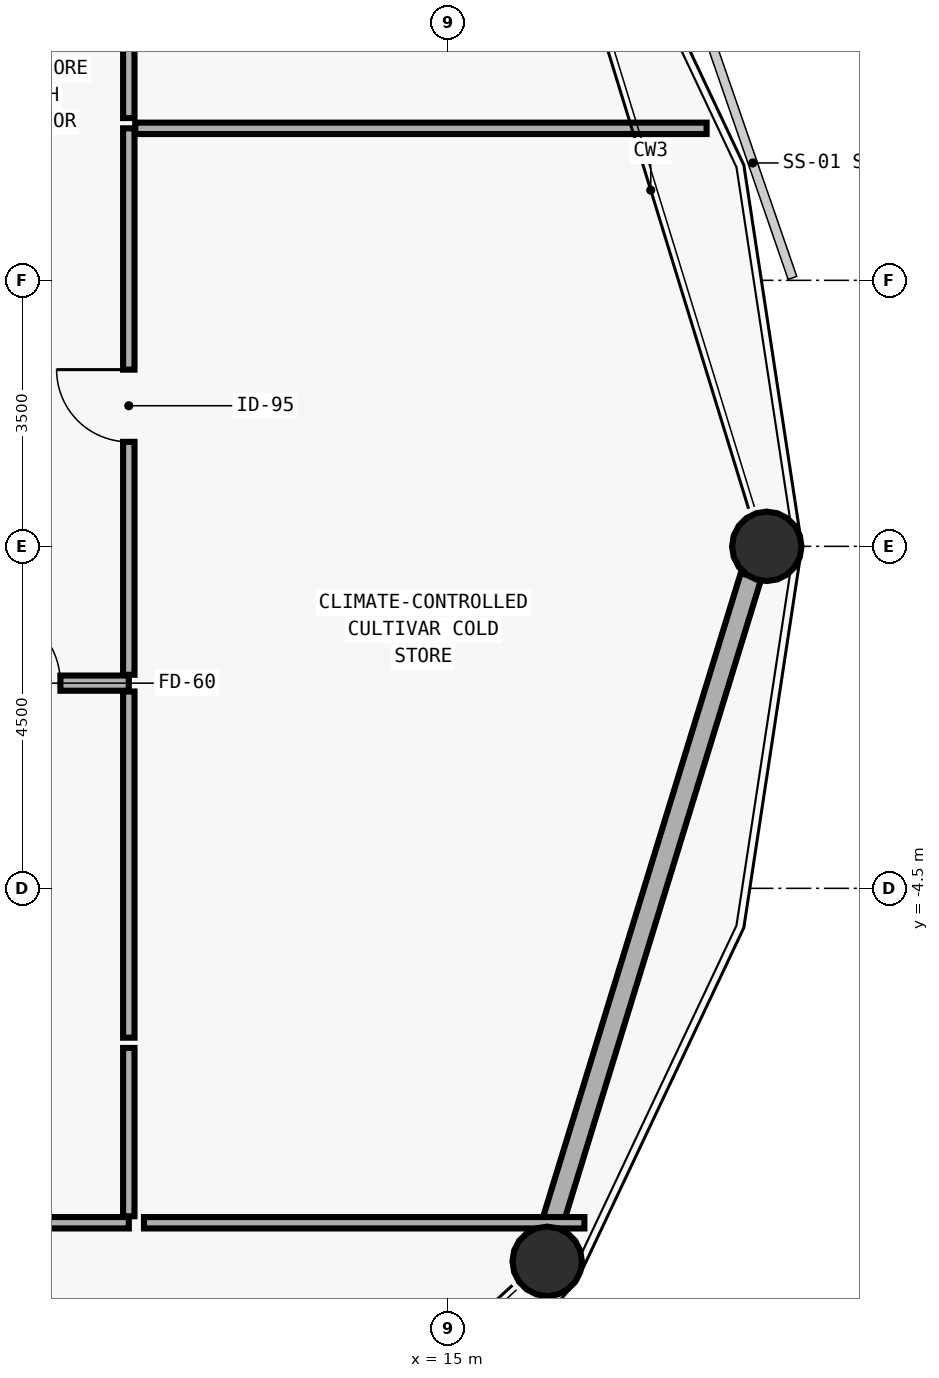
"""IFC4 building model, lengths in metres.
Left out: names, types, materials, properties, quantities, classifications, styles, units other than length and angle.
Written with IfcOpenShell. Run it as: python <this file> out.ifc"""

import sys

from ifc_helpers import new_model, si_unit, direction, frame, frame_2d, origin, origin_2d, place, context, subcontext, project, spatial, rectangle, hollow_circle, extrude, element, fill, save


model = new_model("IFC4")
c1 = context("Model", 3, precision=1e-05, world=origin(), true_north=direction((0.0, 1.0)))
c2 = subcontext(c1, "Body", "Model", "MODEL_VIEW")
j1 = project(units=[si_unit("LENGTHUNIT", "METRE"), si_unit("PLANEANGLEUNIT", "RADIAN")], contexts=[c1])
p1 = place(None, origin())
s1 = spatial("IfcSite", under=j1, at=p1, CompositionType="ELEMENT")
p2 = place(p1, origin())
s2 = spatial("IfcBuilding", under=s1, at=p2, CompositionType="ELEMENT")
p3 = place(p2, frame((0.0, 0.0, 39.3)))
s3 = spatial("IfcBuildingStorey", under=s2, at=p3, CompositionType="ELEMENT", Elevation=39.3)
p4 = place(p3, frame((19.106, 0.0, 0.0), z_axis=(0.045379111193, 0.0, 0.998969837516), x_axis=(0.0, 1.0, 0.0)))
e1 = element("IfcColumn", 1, at=p4, inside=s3, PredefinedType="COLUMN", context=c2, shape_type="SweptSolid", body=[
    extrude(hollow_circle(Radius=0.457, WallThickness=0.032, at=origin_2d()), origin(), (0.0, 0.0, 1.0), 3.879),
])
p5 = place(p3, frame((16.229, -9.374, 0.0), z_axis=(0.039278153326, -0.017498920873, 0.999075079481), x_axis=(0.406953237239, 0.913448992939, 0.0)))
e2 = element("IfcColumn", 2, at=p5, inside=s3, PredefinedType="COLUMN", context=c2, shape_type="SweptSolid", body=[
    extrude(hollow_circle(Radius=0.457, WallThickness=0.032, at=origin_2d()), origin(), (0.0, 0.0, 1.0), 3.879),
])
p6 = place(p3, frame((18.985, -0.394, 0.0), z_axis=(0.0, 0.0, 1.0), x_axis=(-0.293459272164, -0.955971576764, 0.0)))
e3 = element("IfcWall", 3, at=p6, inside=s3, PredefinedType="SOLIDWALL", context=c2, shape_type="SweptSolid", body=[
    extrude(rectangle(XDim=8.982, YDim=0.28, at=frame_2d((4.491, 0.0))), origin(), (0.0, 0.0, 1.0), 3.06),
])
p7 = place(p3, frame((8.16, -1.8, 0.0), z_axis=(0.0, 0.0, 1.0), x_axis=(1.0, 0.0, 0.0)))
e4 = element("IfcWall", 4, at=p7, inside=s3, PredefinedType="MOVABLE", context=c2, shape_type="SweptSolid", body=[
    extrude(rectangle(XDim=2.64, YDim=0.2, at=frame_2d((1.32, 0.0))), origin(), (0.0, 0.0, 1.0), 3.64),
])
p8 = place(p7, frame((0.74, 0.0, 0.0)))
e5 = element("IfcOpeningElement", 5, at=p8, cuts=e4, PredefinedType="OPENING", context=c2, shape_type="SweptSolid", body=[
    extrude(rectangle(XDim=1.0, YDim=2.1, at=frame_2d((0.5, 1.05))), frame((0.0, 0.11, 0.0), z_axis=(0.0, -1.0, 0.0), x_axis=(1.0, 0.0, 0.0)), (0.0, 0.0, 1.0), 0.22),
])
p9 = place(p3, frame((10.8, -1.69, 0.0), z_axis=(0.0, 0.0, 1.0), x_axis=(0.0, 1.0, 0.0)))
e6 = element("IfcWall", 6, at=p9, inside=s3, PredefinedType="PARTITIONING", context=c2, shape_type="SweptSolid", body=[
    extrude(rectangle(XDim=7.19, YDim=0.15, at=frame_2d((3.595, 0.0))), origin(), (0.0, 0.0, 1.0), 3.64),
])
p10 = place(p9, frame((3.065, 0.0, 0.0)))
e7 = element("IfcOpeningElement", 7, at=p10, cuts=e6, PredefinedType="OPENING", context=c2, shape_type="SweptSolid", body=[
    extrude(rectangle(XDim=0.95, YDim=2.1, at=frame_2d((0.475, 1.05))), frame((0.0, 0.085, 0.0), z_axis=(0.0, -1.0, 0.0), x_axis=(1.0, 0.0, 0.0)), (0.0, 0.0, 1.0), 0.17),
])
p11 = place(p3, frame((10.8, 5.635, 0.0), z_axis=(0.0, 0.0, 1.0), x_axis=(0.0, 1.0, 0.0)))
e8 = element("IfcWall", 8, at=p11, inside=s3, PredefinedType="PARTITIONING", context=c2, shape_type="SweptSolid", body=[
    extrude(rectangle(XDim=6.865, YDim=0.15, at=frame_2d((3.433, 0.0))), origin(), (0.0, 0.0, 1.0), 3.64),
])
p12 = place(p11, frame((2.89, 0.0, 0.0)))
e9 = element("IfcOpeningElement", 9, at=p12, cuts=e8, PredefinedType="OPENING", context=c2, shape_type="SweptSolid", body=[
    extrude(rectangle(XDim=0.95, YDim=2.1, at=frame_2d((0.475, 1.05))), frame((0.0, 0.085, 0.0), z_axis=(0.0, -1.0, 0.0), x_axis=(1.0, 0.0, 0.0)), (0.0, 0.0, 1.0), 0.17),
])
p13 = place(p3, frame((8.135, -8.9, 0.0), z_axis=(0.0, 0.0, 1.0), x_axis=(1.0, 0.0, 0.0)))
e10 = element("IfcWall", 10, at=p13, inside=s3, PredefinedType="PARTITIONING", context=c2, shape_type="SweptSolid", body=[
    extrude(rectangle(XDim=2.665, YDim=0.15, at=frame_2d((1.333, 0.0))), origin(), (0.0, 0.0, 1.0), 3.64),
])
p14 = place(p3, frame((11.0, -8.9, 0.0), z_axis=(0.0, 0.0, 1.0), x_axis=(1.0, 0.0, 0.0)))
e11 = element("IfcWall", 11, at=p14, inside=s3, PredefinedType="PARTITIONING", context=c2, shape_type="SweptSolid", body=[
    extrude(rectangle(XDim=5.794, YDim=0.15, at=frame_2d((2.897, 0.0))), origin(), (0.0, 0.0, 1.0), 2.972),
])
p15 = place(p3, frame((10.8, -8.815, 0.0), z_axis=(0.0, 0.0, 1.0), x_axis=(0.0, 1.0, 0.0)))
e12 = element("IfcWall", 12, at=p15, inside=s3, PredefinedType="PARTITIONING", context=c2, shape_type="SweptSolid", body=[
    extrude(rectangle(XDim=2.215, YDim=0.15, at=frame_2d((1.107, 0.0))), origin(), (0.0, 0.0, 1.0), 3.64),
])
p16 = place(p3, frame((10.8, -6.465, 0.0), z_axis=(0.0, 0.0, 1.0), x_axis=(0.0, 1.0, 0.0)))
e13 = element("IfcWall", 13, at=p16, inside=s3, PredefinedType="PARTITIONING", context=c2, shape_type="SweptSolid", body=[
    extrude(rectangle(XDim=4.555, YDim=0.15, at=frame_2d((2.278, 0.0))), origin(), (0.0, 0.0, 1.0), 3.64),
])
p17 = place(p3, frame((10.885, 5.5, 0.0), z_axis=(0.0, 0.0, 1.0), x_axis=(1.0, 0.0, 0.0)))
e14 = element("IfcWall", 14, at=p17, inside=s3, PredefinedType="PARTITIONING", context=c2, shape_type="SweptSolid", body=[
    extrude(rectangle(XDim=7.517, YDim=0.15, at=frame_2d((3.759, 0.0))), origin(), (0.0, 0.0, 1.0), 3.64),
])
p18 = place(p8, origin())
e15 = element("IfcDoor", 15, at=p18, inside=s3, OperationType="SINGLE_SWING_LEFT", PredefinedType="DOOR", context=c2, shape_type="SweptSolid", body=[
    extrude(rectangle(XDim=1.0, YDim=2.1, at=frame_2d((0.5, 1.05))), frame((0.0, 0.025, 0.0), z_axis=(0.0, -1.0, 0.0), x_axis=(1.0, 0.0, 0.0)), (0.0, 0.0, 1.0), 0.05),
])
fill(e5, e15)
p19 = place(p10, origin())
e16 = element("IfcDoor", 16, at=p19, inside=s3, OperationType="SINGLE_SWING_RIGHT", PredefinedType="DOOR", context=c2, shape_type="SweptSolid", body=[
    extrude(rectangle(XDim=0.95, YDim=2.1, at=frame_2d((0.475, 1.05))), frame((0.0, 0.025, 0.0), z_axis=(0.0, -1.0, 0.0), x_axis=(1.0, 0.0, 0.0)), (0.0, 0.0, 1.0), 0.05),
])
fill(e7, e16)
save(model, sys.argv[1])
